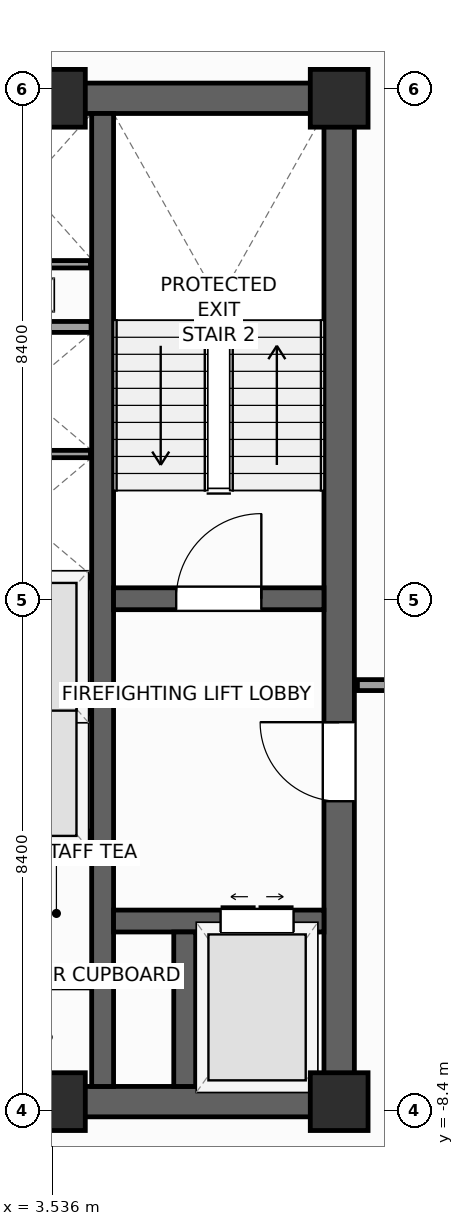
"""IFC4 building model, lengths in metres.
Left out: names, types, materials, properties, quantities, classifications, styles, units other than length and angle.
Written with IfcOpenShell. Run it as: python <this file> out.ifc"""

import sys

from ifc_helpers import new_model, si_unit, direction, frame, frame_2d, origin, origin_2d, place, context, subcontext, project, spatial, rectangle, extrude, source, transform, mapped, element, fill, save


model = new_model("IFC4")
c1 = context("Model", 3, precision=1e-05, world=origin(), true_north=direction((0.0, 1.0)))
c2 = subcontext(c1, "Body", "Model", "MODEL_VIEW")
j1 = project(units=[si_unit("LENGTHUNIT", "METRE"), si_unit("PLANEANGLEUNIT", "RADIAN")], contexts=[c1])
p1 = place(None, origin())
s1 = spatial("IfcSite", under=j1, at=p1, CompositionType="ELEMENT")
p2 = place(p1, origin())
s2 = spatial("IfcBuilding", under=s1, at=p2, CompositionType="ELEMENT")
p3 = place(p2, frame((0.0, 0.0, 217.3)))
s3 = spatial("IfcBuildingStorey", under=s2, at=p3, CompositionType="ELEMENT", Elevation=217.3)
p4 = place(p3, frame((-8.5, -8.25, 0.0), z_axis=(0.0, 0.0, 1.0), x_axis=(1.0, 0.0, 0.0)))
e1 = element("IfcWall", 1, at=p4, inside=s3, PredefinedType="SHEAR", context=c2, shape_type="SweptSolid", body=[
    extrude(rectangle(XDim=17.0, YDim=0.5, at=frame_2d((8.5, 0.0))), origin(), (0.0, 0.0, 1.0), 3.9),
])
p5 = place(p4, frame((7.85, 0.0, 0.0)))
e2 = element("IfcOpeningElement", 2, at=p5, cuts=e1, PredefinedType="OPENING", context=c2, shape_type="SweptSolid", body=[
    extrude(rectangle(XDim=1.3, YDim=2.2, at=frame_2d((0.65, 1.1))), frame((0.0, 0.26, 0.0), z_axis=(0.0, -1.0, 0.0), x_axis=(1.0, 0.0, 0.0)), (0.0, 0.0, 1.0), 0.52),
])
p6 = place(p3, frame((-8.5, 8.25, 0.0), z_axis=(0.0, 0.0, 1.0), x_axis=(1.0, 0.0, 0.0)))
e3 = element("IfcWall", 3, at=p6, inside=s3, PredefinedType="SHEAR", context=c2, shape_type="SweptSolid", body=[
    extrude(rectangle(XDim=17.0, YDim=0.5, at=frame_2d((8.5, 0.0))), origin(), (0.0, 0.0, 1.0), 3.9),
])
p7 = place(p3, frame((8.25, -8.0, 0.0), z_axis=(0.0, 0.0, 1.0), x_axis=(0.0, 1.0, 0.0)))
e4 = element("IfcWall", 4, at=p7, inside=s3, PredefinedType="SHEAR", context=c2, shape_type="SweptSolid", body=[
    extrude(rectangle(XDim=16.0, YDim=0.5, at=frame_2d((8.0, 0.0))), origin(), (0.0, 0.0, 1.0), 3.9),
])
p8 = place(p7, frame((4.69, 0.0, 0.0)))
e5 = element("IfcOpeningElement", 5, at=p8, cuts=e4, PredefinedType="OPENING", context=c2, shape_type="SweptSolid", body=[
    extrude(rectangle(XDim=1.3, YDim=2.2, at=frame_2d((0.65, 1.1))), frame((0.0, 0.26, 0.0), z_axis=(0.0, -1.0, 0.0), x_axis=(1.0, 0.0, 0.0)), (0.0, 0.0, 1.0), 0.52),
])
p9 = place(p3, frame((4.36, -8.0, 0.0), z_axis=(0.0, 0.0, 1.0), x_axis=(0.0, 1.0, 0.0)))
e6 = element("IfcWall", 6, at=p9, inside=s3, PredefinedType="SHEAR", context=c2, shape_type="SweptSolid", body=[
    extrude(rectangle(XDim=16.0, YDim=0.36, at=frame_2d((8.0, 0.0))), origin(), (0.0, 0.0, 1.0), 3.9),
])
p10 = place(p3, frame((4.54, 0.02, 0.0), z_axis=(0.0, 0.0, 1.0), x_axis=(1.0, 0.0, 0.0)))
e7 = element("IfcWall", 7, at=p10, inside=s3, PredefinedType="SHEAR", context=c2, shape_type="SweptSolid", body=[
    extrude(rectangle(XDim=3.46, YDim=0.36, at=frame_2d((1.73, 0.0))), origin(), (0.0, 0.0, 1.0), 3.9),
])
p11 = place(p10, frame((1.03, 0.0, 0.0)))
e8 = element("IfcOpeningElement", 8, at=p11, cuts=e7, PredefinedType="OPENING", context=c2, shape_type="SweptSolid", body=[
    extrude(rectangle(XDim=1.4, YDim=2.2, at=frame_2d((0.7, 1.1))), frame((0.0, 0.19, 0.0), z_axis=(0.0, -1.0, 0.0), x_axis=(1.0, 0.0, 0.0)), (0.0, 0.0, 1.0), 0.38),
])
p12 = place(p3, frame((4.54, -5.28, 0.0), z_axis=(0.0, 0.0, 1.0), x_axis=(1.0, 0.0, 0.0)))
e9 = element("IfcWall", 9, at=p12, inside=s3, PredefinedType="SHEAR", context=c2, shape_type="SweptSolid", body=[
    extrude(rectangle(XDim=3.46, YDim=0.36, at=frame_2d((1.73, 0.0))), origin(), (0.0, 0.0, 1.0), 3.9),
])
p13 = place(p12, frame((1.76, 0.0, 0.0)))
e10 = element("IfcOpeningElement", 10, at=p13, cuts=e9, PredefinedType="OPENING", context=c2, shape_type="SweptSolid", body=[
    extrude(rectangle(XDim=1.2, YDim=2.25, at=frame_2d((0.6, 1.125))), frame((0.0, 0.19, 0.0), z_axis=(0.0, -1.0, 0.0), x_axis=(1.0, 0.0, 0.0)), (0.0, 0.0, 1.0), 0.38),
])
p14 = place(p3, frame((5.71, -8.0, 0.0), z_axis=(0.0, 0.0, 1.0), x_axis=(0.0, 1.0, 0.0)))
e11 = element("IfcWall", 11, at=p14, inside=s3, PredefinedType="SHEAR", context=c2, shape_type="SweptSolid", body=[
    extrude(rectangle(XDim=2.54, YDim=0.36, at=frame_2d((1.27, 0.0))), origin(), (0.0, 0.0, 1.0), 3.9),
])
m1 = source(origin(), c2, "Body", "SweptSolid", [
    extrude(rectangle(XDim=0.95, YDim=0.95, at=origin_2d()), origin(), (0.0, 0.0, 1.0), 3.9),
])
for number, where, z_axis, x_axis in (
    (12, (8.25, -8.25, 0.0), (0.0, 0.0, 1.0), (1.0, 0.0, 0.0)),
    (13, (8.25, 8.25, 0.0), (0.0, 0.0, 1.0), (1.0, 0.0, 0.0)),
    (14, (3.6, -8.25, 0.0), (0.0, 0.0, 1.0), (1.0, 0.0, 0.0)),
    (15, (3.6, 8.25, 0.0), (0.0, 0.0, 1.0), (1.0, 0.0, 0.0)),
):
    element("IfcColumn", number, at=place(p3, frame(where, z_axis=z_axis, x_axis=x_axis)), inside=s3, PredefinedType="PILASTER", context=c2, shape_type="MappedRepresentation", body=[
        mapped(m1, transform((0.0, 0.0, 0.0), scale=1.0)),
    ])
p15 = place(p3, frame((6.733, -29.154, 0.0), z_axis=(0.0, 0.0, 1.0), x_axis=(0.629325378072, 0.77714192302, 0.0)))
e16 = element("IfcWall", 16, at=p15, inside=s3, PredefinedType="STANDARD", context=c2, shape_type="SweptSolid", body=[
    extrude(rectangle(XDim=36.84, YDim=0.34, at=frame_2d((18.42, 0.0))), origin(), (0.0, 0.0, 1.0), 2.96),
])
p16 = place(p15, frame((3.721, 0.0, 0.48)))
e17 = element("IfcOpeningElement", 17, at=p16, cuts=e16, PredefinedType="OPENING", context=c2, shape_type="SweptSolid", body=[
    extrude(rectangle(XDim=1.4, YDim=2.4, at=frame_2d((0.7, 1.2))), frame((0.0, 0.18, 0.0), z_axis=(0.0, -1.0, 0.0), x_axis=(1.0, 0.0, 0.0)), (0.0, 0.0, 1.0), 0.36),
])
p17 = place(p15, frame((10.559, 0.0, 0.58)))
e18 = element("IfcOpeningElement", 18, at=p17, cuts=e16, PredefinedType="OPENING", context=c2, shape_type="SweptSolid", body=[
    extrude(rectangle(XDim=1.75, YDim=2.3, at=frame_2d((0.875, 1.15))), frame((0.0, 0.18, 0.0), z_axis=(0.0, -1.0, 0.0), x_axis=(1.0, 0.0, 0.0)), (0.0, 0.0, 1.0), 0.36),
])
p18 = place(p15, frame((16.058, 0.0, 0.58)))
e19 = element("IfcOpeningElement", 19, at=p18, cuts=e16, PredefinedType="OPENING", context=c2, shape_type="SweptSolid", body=[
    extrude(rectangle(XDim=1.75, YDim=2.3, at=frame_2d((0.875, 1.15))), frame((0.0, 0.18, 0.0), z_axis=(0.0, -1.0, 0.0), x_axis=(1.0, 0.0, 0.0)), (0.0, 0.0, 1.0), 0.36),
])
p19 = place(p15, frame((24.176, 0.0, 0.58)))
e20 = element("IfcOpeningElement", 20, at=p19, cuts=e16, PredefinedType="OPENING", context=c2, shape_type="SweptSolid", body=[
    extrude(rectangle(XDim=1.75, YDim=2.3, at=frame_2d((0.875, 1.15))), frame((0.0, 0.18, 0.0), z_axis=(0.0, -1.0, 0.0), x_axis=(1.0, 0.0, 0.0)), (0.0, 0.0, 1.0), 0.36),
])
p20 = place(p15, frame((31.732, 0.0, 0.48)))
e21 = element("IfcOpeningElement", 21, at=p20, cuts=e16, PredefinedType="OPENING", context=c2, shape_type="SweptSolid", body=[
    extrude(rectangle(XDim=1.4, YDim=2.4, at=frame_2d((0.7, 1.2))), frame((0.0, 0.18, 0.0), z_axis=(0.0, -1.0, 0.0), x_axis=(1.0, 0.0, 0.0)), (0.0, 0.0, 1.0), 0.36),
])
p21 = place(p3, frame((29.154, 6.733, 0.0), z_axis=(0.0, 0.0, 1.0), x_axis=(-0.77714192302, 0.629325378072, 0.0)))
e22 = element("IfcWall", 22, at=p21, inside=s3, PredefinedType="STANDARD", context=c2, shape_type="SweptSolid", body=[
    extrude(rectangle(XDim=36.84, YDim=0.34, at=frame_2d((18.42, 0.0))), origin(), (0.0, 0.0, 1.0), 2.96),
])
p22 = place(p21, frame((23.495, 0.0, 0.0)))
e23 = element("IfcOpeningElement", 23, at=p22, cuts=e22, PredefinedType="OPENING", context=c2, shape_type="SweptSolid", body=[
    extrude(rectangle(XDim=1.05, YDim=2.25, at=frame_2d((0.525, 1.125))), frame((0.0, 0.18, 0.0), z_axis=(0.0, -1.0, 0.0), x_axis=(1.0, 0.0, 0.0)), (0.0, 0.0, 1.0), 0.36),
])
p23 = place(p21, frame((3.721, 0.0, 0.48)))
e24 = element("IfcOpeningElement", 24, at=p23, cuts=e22, PredefinedType="OPENING", context=c2, shape_type="SweptSolid", body=[
    extrude(rectangle(XDim=1.4, YDim=2.4, at=frame_2d((0.7, 1.2))), frame((0.0, 0.18, 0.0), z_axis=(0.0, -1.0, 0.0), x_axis=(1.0, 0.0, 0.0)), (0.0, 0.0, 1.0), 0.36),
])
p24 = place(p21, frame((9.809, 0.0, 0.58)))
e25 = element("IfcOpeningElement", 25, at=p24, cuts=e22, PredefinedType="OPENING", context=c2, shape_type="SweptSolid", body=[
    extrude(rectangle(XDim=1.75, YDim=2.3, at=frame_2d((0.875, 1.15))), frame((0.0, 0.18, 0.0), z_axis=(0.0, -1.0, 0.0), x_axis=(1.0, 0.0, 0.0)), (0.0, 0.0, 1.0), 0.36),
])
p25 = place(p21, frame((16.058, 0.0, 0.58)))
e26 = element("IfcOpeningElement", 26, at=p25, cuts=e22, PredefinedType="OPENING", context=c2, shape_type="SweptSolid", body=[
    extrude(rectangle(XDim=1.75, YDim=2.3, at=frame_2d((0.875, 1.15))), frame((0.0, 0.18, 0.0), z_axis=(0.0, -1.0, 0.0), x_axis=(1.0, 0.0, 0.0)), (0.0, 0.0, 1.0), 0.36),
])
p26 = place(p21, frame((25.676, 0.0, 0.58)))
e27 = element("IfcOpeningElement", 27, at=p26, cuts=e22, PredefinedType="OPENING", context=c2, shape_type="SweptSolid", body=[
    extrude(rectangle(XDim=1.75, YDim=2.3, at=frame_2d((0.875, 1.15))), frame((0.0, 0.18, 0.0), z_axis=(0.0, -1.0, 0.0), x_axis=(1.0, 0.0, 0.0)), (0.0, 0.0, 1.0), 0.36),
])
p27 = place(p21, frame((30.982, 0.0, 0.48)))
e28 = element("IfcOpeningElement", 28, at=p27, cuts=e22, PredefinedType="OPENING", context=c2, shape_type="SweptSolid", body=[
    extrude(rectangle(XDim=1.4, YDim=2.4, at=frame_2d((0.7, 1.2))), frame((0.0, 0.18, 0.0), z_axis=(0.0, -1.0, 0.0), x_axis=(1.0, 0.0, 0.0)), (0.0, 0.0, 1.0), 0.36),
])
for number, where, z_axis, x_axis in (
    (29, (1.89, -3.9, 0.0), (0.0, 0.0, 1.0), (1.0, 0.0, 0.0)),
    (30, (1.89, 0.3, 0.0), (0.0, 0.0, 1.0), (1.0, 0.0, 0.0)),
    (31, (1.89, 4.49, 0.0), (0.0, 0.0, 1.0), (1.0, 0.0, 0.0)),
):
    element("IfcWall", number, at=place(p3, frame(where, z_axis=z_axis, x_axis=x_axis)), inside=s3, PredefinedType="PARTITIONING", context=c2, shape_type="SweptSolid", body=[
        extrude(rectangle(XDim=2.28, YDim=0.18, at=frame_2d((1.14, 0.0))), origin(), (0.0, 0.0, 1.0), 3.66),
    ])
for number, where, z_axis, x_axis in (
    (32, (1.9, -1.8, 0.0), (0.0, 0.0, 1.0), (1.0, 0.0, 0.0)),
    (33, (1.9, 2.4, 0.0), (0.0, 0.0, 1.0), (1.0, 0.0, 0.0)),
):
    element("IfcWall", number, at=place(p3, frame(where, z_axis=z_axis, x_axis=x_axis)), inside=s3, PredefinedType="PARTITIONING", context=c2, shape_type="SweptSolid", body=[
        extrude(rectangle(XDim=2.26, YDim=0.12, at=frame_2d((1.13, 0.0))), origin(), (0.0, 0.0, 1.0), 3.66),
    ])
p28 = place(p3, frame((1.89, -6.3, 0.0), z_axis=(0.0, 0.0, 1.0), x_axis=(1.0, 0.0, 0.0)))
e34 = element("IfcWall", 34, at=p28, inside=s3, PredefinedType="PARTITIONING", context=c2, shape_type="SweptSolid", body=[
    extrude(rectangle(XDim=2.28, YDim=0.16, at=frame_2d((1.14, 0.0))), origin(), (0.0, 0.0, 1.0), 3.66),
])
p29 = place(p3, frame((2.06, 5.52, 0.0), z_axis=(0.0, 0.0, 1.0), x_axis=(1.0, 0.0, 0.0)))
e35 = element("IfcWall", 35, at=p29, inside=s3, PredefinedType="PARTITIONING", context=c2, shape_type="SweptSolid", body=[
    extrude(rectangle(XDim=2.1, YDim=0.12, at=frame_2d((1.05, 0.0))), origin(), (0.0, 0.0, 1.0), 3.66),
])
p30 = place(p3, frame((8.55, -1.4, 0.0), z_axis=(0.0, 0.0, 1.0), x_axis=(1.0, 0.0, 0.0)))
e36 = element("IfcWall", 36, at=p30, inside=s3, PredefinedType="PARTITIONING", context=c2, shape_type="SweptSolid", body=[
    extrude(rectangle(XDim=2.8, YDim=0.18, at=frame_2d((1.4, 0.0))), origin(), (0.0, 0.0, 1.0), 3.66),
])
p31 = place(p30, frame((0.85, 0.0, 0.0)))
e37 = element("IfcOpeningElement", 37, at=p31, cuts=e36, PredefinedType="OPENING", context=c2, shape_type="SweptSolid", body=[
    extrude(rectangle(XDim=1.1, YDim=2.2, at=frame_2d((0.55, 1.1))), frame((0.0, 0.1, 0.0), z_axis=(0.0, -1.0, 0.0), x_axis=(1.0, 0.0, 0.0)), (0.0, 0.0, 1.0), 0.2),
])
m2 = source(origin(), c2, "Body", "SweptSolid", [
    extrude(rectangle(XDim=1.4, YDim=2.2, at=frame_2d((0.7, 1.1))), frame((0.0, 0.025, 0.0), z_axis=(0.0, -1.0, 0.0), x_axis=(1.0, 0.0, 0.0)), (0.0, 0.0, 1.0), 0.05),
])
p32 = place(p11, origin())
e38 = element("IfcDoor", 38, at=p32, inside=s3, OperationType="SINGLE_SWING_RIGHT", PredefinedType="DOOR", context=c2, shape_type="MappedRepresentation", body=[
    mapped(m2, transform((0.0, 0.0, 0.0), scale=1.0)),
])
fill(e8, e38)
m3 = source(origin(), c2, "Body", "SweptSolid", [
    extrude(rectangle(XDim=1.3, YDim=2.2, at=frame_2d((0.65, 1.1))), frame((0.0, 0.025, 0.0), z_axis=(0.0, -1.0, 0.0), x_axis=(1.0, 0.0, 0.0)), (0.0, 0.0, 1.0), 0.05),
])
p33 = place(p8, origin())
e39 = element("IfcDoor", 39, at=p33, inside=s3, OperationType="SINGLE_SWING_RIGHT", PredefinedType="DOOR", context=c2, shape_type="MappedRepresentation", body=[
    mapped(m3, transform((0.0, 0.0, 0.0), scale=1.0)),
])
fill(e5, e39)
m4 = source(origin(), c2, "Body", "SweptSolid", [
    extrude(rectangle(XDim=1.2, YDim=2.25, at=frame_2d((0.6, 1.125))), frame((0.0, 0.025, 0.0), z_axis=(0.0, -1.0, 0.0), x_axis=(1.0, 0.0, 0.0)), (0.0, 0.0, 1.0), 0.05),
])
p34 = place(p13, origin())
e40 = element("IfcDoor", 40, at=p34, inside=s3, OperationType="DOUBLE_DOOR_SLIDING", PredefinedType="DOOR", context=c2, shape_type="MappedRepresentation", body=[
    mapped(m4, transform((0.0, 0.0, 0.0), scale=1.0)),
])
fill(e10, e40)
save(model, sys.argv[1])
